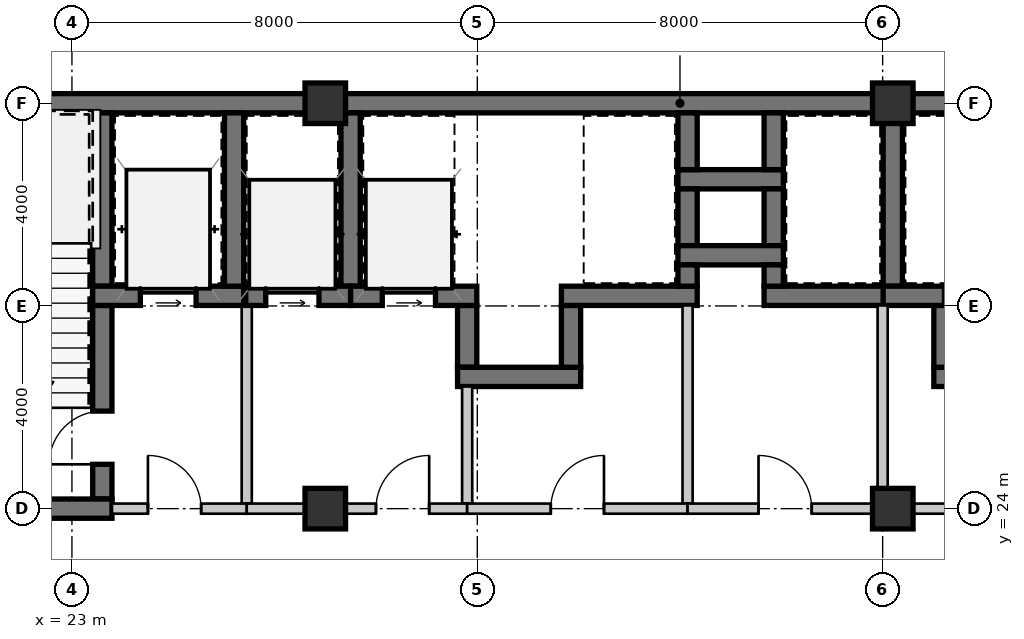
"""IFC4 building model, lengths in metres.
Left out: names, types, materials, properties, quantities, classifications, styles, units other than length and angle.
Written with IfcOpenShell. Run it as: python <this file> out.ifc"""

import sys

from ifc_helpers import new_model, si_unit, direction, frame, frame_2d, origin, origin_2d, place, context, subcontext, project, spatial, rectangle, extrude, source, transform, mapped, element, fill, save


model = new_model("IFC4")
c1 = context("Model", 3, precision=1e-05, world=origin(), true_north=direction((0.0, 1.0)))
c2 = subcontext(c1, "Body", "Model", "MODEL_VIEW")
j1 = project(units=[si_unit("LENGTHUNIT", "METRE"), si_unit("PLANEANGLEUNIT", "RADIAN")], contexts=[c1])
p1 = place(None, origin())
s1 = spatial("IfcSite", under=j1, at=p1, CompositionType="ELEMENT")
p2 = place(p1, origin())
s2 = spatial("IfcBuilding", under=s1, at=p2, CompositionType="ELEMENT")
p3 = place(p2, frame((0.0, 0.0, 57.75)))
s3 = spatial("IfcBuildingStorey", under=s2, at=p3, CompositionType="ELEMENT", Elevation=57.75)
m1 = source(origin(), c2, "Body", "SweptSolid", [
    extrude(rectangle(XDim=0.8, YDim=0.8, at=origin_2d()), origin(), (0.0, 0.0, 1.0), 3.15),
])
for number, where, z_axis, x_axis in (
    (1, (28.0, 24.0, 0.0), (0.0, 0.0, 1.0), (1.0, 0.0, 0.0)),
    (2, (39.2, 24.0, 0.0), (0.0, 0.0, 1.0), (1.0, 0.0, 0.0)),
    (3, (28.0, 32.0, 0.0), (0.0, 0.0, 1.0), (1.0, 0.0, 0.0)),
    (4, (39.2, 32.0, 0.0), (0.0, 0.0, 1.0), (1.0, 0.0, 0.0)),
):
    element("IfcColumn", number, at=place(p3, frame(where, z_axis=z_axis, x_axis=x_axis)), inside=s3, PredefinedType="COLUMN", context=c2, shape_type="MappedRepresentation", body=[
        mapped(m1, transform((0.0, 0.0, 0.0), scale=1.0)),
    ])
m2 = source(origin(), c2, "Body", "SweptSolid", [
    extrude(rectangle(XDim=9.19, YDim=0.38, at=frame_2d((4.595, 0.0))), origin(), (0.0, 0.0, 1.0), 2.87),
])
p4 = place(p3, frame((18.81, 32.0, 0.0), z_axis=(0.0, 0.0, 1.0), x_axis=(1.0, 0.0, 0.0)))
e5 = element("IfcWall", 5, at=p4, inside=s3, PredefinedType="SHEAR", context=c2, shape_type="MappedRepresentation", body=[
    mapped(m2, transform((0.0, 0.0, 0.0), scale=1.0)),
])
m3 = source(origin(), c2, "Body", "SweptSolid", [
    extrude(rectangle(XDim=11.2, YDim=0.38, at=frame_2d((5.6, 0.0))), origin(), (0.0, 0.0, 1.0), 2.87),
])
p5 = place(p3, frame((28.0, 32.0, 0.0), z_axis=(0.0, 0.0, 1.0), x_axis=(1.0, 0.0, 0.0)))
e6 = element("IfcWall", 6, at=p5, inside=s3, PredefinedType="SHEAR", context=c2, shape_type="MappedRepresentation", body=[
    mapped(m3, transform((0.0, 0.0, 0.0), scale=1.0)),
])
m4 = source(origin(), c2, "Body", "SweptSolid", [
    extrude(rectangle(XDim=11.99, YDim=0.38, at=frame_2d((5.995, 0.0))), origin(), (0.0, 0.0, 1.0), 2.87),
])
p6 = place(p3, frame((39.2, 32.0, 0.0), z_axis=(0.0, 0.0, 1.0), x_axis=(1.0, 0.0, 0.0)))
e7 = element("IfcWall", 7, at=p6, inside=s3, PredefinedType="SHEAR", context=c2, shape_type="MappedRepresentation", body=[
    mapped(m4, transform((0.0, 0.0, 0.0), scale=1.0)),
])
m5 = source(origin(), c2, "Body", "SweptSolid", [
    extrude(rectangle(XDim=3.42, YDim=0.38, at=frame_2d((1.71, 0.0))), origin(), (0.0, 0.0, 1.0), 2.87),
])
p7 = place(p3, frame((23.6, 28.39, 0.0), z_axis=(0.0, 0.0, 1.0), x_axis=(0.0, 1.0, 0.0)))
e8 = element("IfcWall", 8, at=p7, inside=s3, PredefinedType="SHEAR", context=c2, shape_type="MappedRepresentation", body=[
    mapped(m5, transform((0.0, 0.0, 0.0), scale=1.0)),
])
m6 = source(origin(), c2, "Body", "SweptSolid", [
    extrude(rectangle(XDim=3.82, YDim=0.38, at=frame_2d((1.91, 0.0))), origin(), (0.0, 0.0, 1.0), 2.87),
])
p8 = place(p3, frame((23.6, 24.19, 0.0), z_axis=(0.0, 0.0, 1.0), x_axis=(0.0, 1.0, 0.0)))
e9 = element("IfcWall", 9, at=p8, inside=s3, PredefinedType="SHEAR", context=c2, shape_type="MappedRepresentation", body=[
    mapped(m6, transform((0.0, 0.0, 0.0), scale=1.0)),
])
m7 = source(origin(), c2, "Body", "SweptSolid", [
    extrude(rectangle(XDim=1.05, YDim=2.1, at=frame_2d((0.525, 1.05))), frame((0.0, 0.2, 0.0), z_axis=(0.0, -1.0, 0.0), x_axis=(1.0, 0.0, 0.0)), (0.0, 0.0, 1.0), 0.4),
])
p9 = place(p8, frame((0.685, 0.0, 0.0)))
e10 = element("IfcOpeningElement", 10, at=p9, cuts=e9, PredefinedType="OPENING", context=c2, shape_type="MappedRepresentation", body=[
    mapped(m7, transform((0.0, 0.0, 0.0), scale=1.0)),
])
m8 = source(origin(), c2, "Body", "SweptSolid", [
    extrude(rectangle(XDim=4.98, YDim=0.38, at=frame_2d((2.49, 0.0))), origin(), (0.0, 0.0, 1.0), 2.87),
])
p10 = place(p3, frame((18.81, 24.0, 0.0), z_axis=(0.0, 0.0, 1.0), x_axis=(1.0, 0.0, 0.0)))
e11 = element("IfcWall", 11, at=p10, inside=s3, PredefinedType="SHEAR", context=c2, shape_type="MappedRepresentation", body=[
    mapped(m8, transform((0.0, 0.0, 0.0), scale=1.0)),
])
m9 = source(origin(), c2, "Body", "SweptSolid", [
    extrude(rectangle(XDim=2.98, YDim=0.38, at=frame_2d((1.49, 0.0))), origin(), (0.0, 0.0, 1.0), 2.87),
])
p11 = place(p3, frame((23.41, 28.2, 0.0), z_axis=(0.0, 0.0, 1.0), x_axis=(1.0, 0.0, 0.0)))
e12 = element("IfcWall", 12, at=p11, inside=s3, PredefinedType="SHEAR", context=c2, shape_type="MappedRepresentation", body=[
    mapped(m9, transform((0.0, 0.0, 0.0), scale=1.0)),
])
m10 = source(origin(), c2, "Body", "SweptSolid", [
    extrude(rectangle(XDim=1.1, YDim=2.15, at=frame_2d((0.55, 1.075))), frame((0.0, 0.2, 0.0), z_axis=(0.0, -1.0, 0.0), x_axis=(1.0, 0.0, 0.0)), (0.0, 0.0, 1.0), 0.4),
])
p12 = place(p11, frame((0.94, 0.0, 0.0)))
e13 = element("IfcOpeningElement", 13, at=p12, cuts=e12, PredefinedType="OPENING", context=c2, shape_type="MappedRepresentation", body=[
    mapped(m10, transform((0.0, 0.0, 0.0), scale=1.0)),
])
p13 = place(p3, frame((26.2, 28.39, 0.0), z_axis=(0.0, 0.0, 1.0), x_axis=(0.0, 1.0, 0.0)))
e14 = element("IfcWall", 14, at=p13, inside=s3, PredefinedType="SHEAR", context=c2, shape_type="MappedRepresentation", body=[
    mapped(m5, transform((0.0, 0.0, 0.0), scale=1.0)),
])
m11 = source(origin(), c2, "Body", "SweptSolid", [
    extrude(rectangle(XDim=3.91, YDim=0.2, at=frame_2d((1.955, 0.0))), origin(), (0.0, 0.0, 1.0), 2.87),
])
p14 = place(p3, frame((26.45, 24.1, 0.0), z_axis=(0.0, 0.0, 1.0), x_axis=(0.0, 1.0, 0.0)))
e15 = element("IfcWall", 15, at=p14, inside=s3, PredefinedType="SOLIDWALL", context=c2, shape_type="MappedRepresentation", body=[
    mapped(m11, transform((0.0, 0.0, 0.0), scale=1.0)),
])
m12 = source(origin(), c2, "Body", "SweptSolid", [
    extrude(rectangle(XDim=2.66, YDim=0.2, at=frame_2d((1.33, 0.0))), origin(), (0.0, 0.0, 1.0), 2.41),
])
p15 = place(p3, frame((23.79, 24.0, 0.0), z_axis=(0.0, 0.0, 1.0), x_axis=(1.0, 0.0, 0.0)))
e16 = element("IfcWall", 16, at=p15, inside=s3, PredefinedType="SOLIDWALL", context=c2, shape_type="MappedRepresentation", body=[
    mapped(m12, transform((0.0, 0.0, 0.0), scale=1.0)),
])
m13 = source(origin(), c2, "Body", "SweptSolid", [
    extrude(rectangle(XDim=1.05, YDim=2.1, at=frame_2d((0.525, 1.05))), frame((0.0, 0.11, 0.0), z_axis=(0.0, -1.0, 0.0), x_axis=(1.0, 0.0, 0.0)), (0.0, 0.0, 1.0), 0.22),
])
p16 = place(p15, frame((0.71, 0.0, 0.0)))
e17 = element("IfcOpeningElement", 17, at=p16, cuts=e16, PredefinedType="OPENING", context=c2, shape_type="MappedRepresentation", body=[
    mapped(m13, transform((0.0, 0.0, 0.0), scale=1.0)),
])
m14 = source(origin(), c2, "Body", "SweptSolid", [
    extrude(rectangle(XDim=2.08, YDim=0.38, at=frame_2d((1.04, 0.0))), origin(), (0.0, 0.0, 1.0), 2.87),
])
p17 = place(p3, frame((34.96, 30.5, 0.0), z_axis=(0.0, 0.0, 1.0), x_axis=(1.0, 0.0, 0.0)))
e18 = element("IfcWall", 18, at=p17, inside=s3, PredefinedType="SHEAR", context=c2, shape_type="MappedRepresentation", body=[
    mapped(m14, transform((0.0, 0.0, 0.0), scale=1.0)),
])
m15 = source(origin(), c2, "Body", "SweptSolid", [
    extrude(rectangle(XDim=1.12, YDim=0.38, at=frame_2d((0.56, 0.0))), origin(), (0.0, 0.0, 1.0), 2.87),
])
for number, where, z_axis, x_axis in (
    (19, (35.15, 31.81, 0.0), (0.0, 0.0, 1.0), (0.0, -1.0, 0.0)),
    (20, (36.85, 30.69, 0.0), (0.0, 0.0, 1.0), (0.0, 1.0, 0.0)),
    (21, (35.15, 30.31, 0.0), (0.0, 0.0, 1.0), (0.0, -1.0, 0.0)),
    (22, (36.85, 29.19, 0.0), (0.0, 0.0, 1.0), (0.0, 1.0, 0.0)),
):
    element("IfcWall", number, at=place(p3, frame(where, z_axis=z_axis, x_axis=x_axis)), inside=s3, PredefinedType="SHEAR", context=c2, shape_type="MappedRepresentation", body=[
        mapped(m15, transform((0.0, 0.0, 0.0), scale=1.0)),
    ])
p18 = place(p3, frame((34.96, 29.0, 0.0), z_axis=(0.0, 0.0, 1.0), x_axis=(1.0, 0.0, 0.0)))
e23 = element("IfcWall", 23, at=p18, inside=s3, PredefinedType="SHEAR", context=c2, shape_type="MappedRepresentation", body=[
    mapped(m14, transform((0.0, 0.0, 0.0), scale=1.0)),
])
m16 = source(origin(), c2, "Body", "SweptSolid", [
    extrude(rectangle(XDim=1.22, YDim=0.38, at=frame_2d((0.61, 0.0))), origin(), (0.0, 0.0, 1.0), 2.87),
])
p19 = place(p3, frame((30.8, 28.01, 0.0), z_axis=(0.0, 0.0, 1.0), x_axis=(0.0, -1.0, 0.0)))
e24 = element("IfcWall", 24, at=p19, inside=s3, PredefinedType="SHEAR", context=c2, shape_type="MappedRepresentation", body=[
    mapped(m16, transform((0.0, 0.0, 0.0), scale=1.0)),
])
m17 = source(origin(), c2, "Body", "SweptSolid", [
    extrude(rectangle(XDim=2.43, YDim=0.38, at=frame_2d((1.215, 0.0))), origin(), (0.0, 0.0, 1.0), 2.87),
])
p20 = place(p3, frame((30.61, 26.6, 0.0), z_axis=(0.0, 0.0, 1.0), x_axis=(1.0, 0.0, 0.0)))
e25 = element("IfcWall", 25, at=p20, inside=s3, PredefinedType="SHEAR", context=c2, shape_type="MappedRepresentation", body=[
    mapped(m17, transform((0.0, 0.0, 0.0), scale=1.0)),
])
p21 = place(p3, frame((32.85, 26.79, 0.0), z_axis=(0.0, 0.0, 1.0), x_axis=(0.0, 1.0, 0.0)))
e26 = element("IfcWall", 26, at=p21, inside=s3, PredefinedType="SHEAR", context=c2, shape_type="MappedRepresentation", body=[
    mapped(m16, transform((0.0, 0.0, 0.0), scale=1.0)),
])
m18 = source(origin(), c2, "Body", "SweptSolid", [
    extrude(rectangle(XDim=1.32, YDim=0.38, at=frame_2d((0.66, 0.0))), origin(), (0.0, 0.0, 1.0), 2.87),
])
p22 = place(p3, frame((41.52, 28.2, 0.0), z_axis=(0.0, 0.0, 1.0), x_axis=(-1.0, 0.0, 0.0)))
e27 = element("IfcWall", 27, at=p22, inside=s3, PredefinedType="SHEAR", context=c2, shape_type="MappedRepresentation", body=[
    mapped(m18, transform((0.0, 0.0, 0.0), scale=1.0)),
])
m19 = source(origin(), c2, "Body", "SweptSolid", [
    extrude(rectangle(XDim=2.33, YDim=0.38, at=frame_2d((1.165, 0.0))), origin(), (0.0, 0.0, 1.0), 2.87),
])
p23 = place(p3, frame((40.01, 26.6, 0.0), z_axis=(0.0, 0.0, 1.0), x_axis=(1.0, 0.0, 0.0)))
e28 = element("IfcWall", 28, at=p23, inside=s3, PredefinedType="SHEAR", context=c2, shape_type="MappedRepresentation", body=[
    mapped(m19, transform((0.0, 0.0, 0.0), scale=1.0)),
])
p24 = place(p3, frame((40.2, 28.01, 0.0), z_axis=(0.0, 0.0, 1.0), x_axis=(0.0, -1.0, 0.0)))
e29 = element("IfcWall", 29, at=p24, inside=s3, PredefinedType="SHEAR", context=c2, shape_type="MappedRepresentation", body=[
    mapped(m16, transform((0.0, 0.0, 0.0), scale=1.0)),
])
p25 = place(p3, frame((28.5, 28.39, 0.0), z_axis=(0.0, 0.0, 1.0), x_axis=(0.0, 1.0, 0.0)))
e30 = element("IfcWall", 30, at=p25, inside=s3, PredefinedType="SHEAR", context=c2, shape_type="MappedRepresentation", body=[
    mapped(m5, transform((0.0, 0.0, 0.0), scale=1.0)),
])
m20 = source(origin(), c2, "Body", "SweptSolid", [
    extrude(rectangle(XDim=2.07, YDim=0.38, at=frame_2d((1.035, 0.0))), origin(), (0.0, 0.0, 1.0), 2.87),
])
p26 = place(p3, frame((26.43, 28.2, 0.0), z_axis=(0.0, 0.0, 1.0), x_axis=(1.0, 0.0, 0.0)))
e31 = element("IfcWall", 31, at=p26, inside=s3, PredefinedType="SHEAR", context=c2, shape_type="MappedRepresentation", body=[
    mapped(m20, transform((0.0, 0.0, 0.0), scale=1.0)),
])
m21 = source(origin(), c2, "Body", "SweptSolid", [
    extrude(rectangle(XDim=1.05, YDim=2.15, at=frame_2d((0.525, 1.075))), frame((0.0, 0.2, 0.0), z_axis=(0.0, -1.0, 0.0), x_axis=(1.0, 0.0, 0.0)), (0.0, 0.0, 1.0), 0.4),
])
p27 = place(p26, frame((0.395, 0.0, 0.0)))
e32 = element("IfcOpeningElement", 32, at=p27, cuts=e31, PredefinedType="OPENING", context=c2, shape_type="MappedRepresentation", body=[
    mapped(m21, transform((0.0, 0.0, 0.0), scale=1.0)),
])
m22 = source(origin(), c2, "Body", "SweptSolid", [
    extrude(rectangle(XDim=2.49, YDim=0.38, at=frame_2d((1.245, 0.0))), origin(), (0.0, 0.0, 1.0), 2.87),
])
p28 = place(p3, frame((28.5, 28.2, 0.0), z_axis=(0.0, 0.0, 1.0), x_axis=(1.0, 0.0, 0.0)))
e33 = element("IfcWall", 33, at=p28, inside=s3, PredefinedType="SHEAR", context=c2, shape_type="MappedRepresentation", body=[
    mapped(m22, transform((0.0, 0.0, 0.0), scale=1.0)),
])
p29 = place(p28, frame((0.625, 0.0, 0.0)))
e34 = element("IfcOpeningElement", 34, at=p29, cuts=e33, PredefinedType="OPENING", context=c2, shape_type="MappedRepresentation", body=[
    mapped(m21, transform((0.0, 0.0, 0.0), scale=1.0)),
])
m23 = source(origin(), c2, "Body", "SweptSolid", [
    extrude(rectangle(XDim=2.31, YDim=0.2, at=frame_2d((1.155, 0.0))), origin(), (0.0, 0.0, 1.0), 2.87),
])
p30 = place(p3, frame((30.8, 26.41, 0.0), z_axis=(0.0, 0.0, 1.0), x_axis=(0.0, -1.0, 0.0)))
e35 = element("IfcWall", 35, at=p30, inside=s3, PredefinedType="SOLIDWALL", context=c2, shape_type="MappedRepresentation", body=[
    mapped(m23, transform((0.0, 0.0, 0.0), scale=1.0)),
])
m24 = source(origin(), c2, "Body", "SweptSolid", [
    extrude(rectangle(XDim=4.35, YDim=0.2, at=frame_2d((2.175, 0.0))), origin(), (0.0, 0.0, 1.0), 2.41),
])
p31 = place(p3, frame((30.8, 24.0, 0.0), z_axis=(0.0, 0.0, 1.0), x_axis=(-1.0, 0.0, 0.0)))
e36 = element("IfcWall", 36, at=p31, inside=s3, PredefinedType="SOLIDWALL", context=c2, shape_type="MappedRepresentation", body=[
    mapped(m24, transform((0.0, 0.0, 0.0), scale=1.0)),
])
p32 = place(p31, frame((0.75, 0.0, 0.0)))
e37 = element("IfcOpeningElement", 37, at=p32, cuts=e36, PredefinedType="OPENING", context=c2, shape_type="MappedRepresentation", body=[
    mapped(m13, transform((0.0, 0.0, 0.0), scale=1.0)),
])
m25 = source(origin(), c2, "Body", "SweptSolid", [
    extrude(rectangle(XDim=2.68, YDim=0.38, at=frame_2d((1.34, 0.0))), origin(), (0.0, 0.0, 1.0), 2.87),
])
p33 = place(p3, frame((32.66, 28.2, 0.0), z_axis=(0.0, 0.0, 1.0), x_axis=(1.0, 0.0, 0.0)))
e38 = element("IfcWall", 38, at=p33, inside=s3, PredefinedType="SHEAR", context=c2, shape_type="MappedRepresentation", body=[
    mapped(m25, transform((0.0, 0.0, 0.0), scale=1.0)),
])
m26 = source(origin(), c2, "Body", "SweptSolid", [
    extrude(rectangle(XDim=0.42, YDim=0.38, at=frame_2d((0.21, 0.0))), origin(), (0.0, 0.0, 1.0), 2.87),
])
p34 = place(p3, frame((35.15, 28.39, 0.0), z_axis=(0.0, 0.0, 1.0), x_axis=(0.0, 1.0, 0.0)))
e39 = element("IfcWall", 39, at=p34, inside=s3, PredefinedType="SHEAR", context=c2, shape_type="MappedRepresentation", body=[
    mapped(m26, transform((0.0, 0.0, 0.0), scale=1.0)),
])
p35 = place(p3, frame((39.2, 28.39, 0.0), z_axis=(0.0, 0.0, 1.0), x_axis=(0.0, 1.0, 0.0)))
e40 = element("IfcWall", 40, at=p35, inside=s3, PredefinedType="SHEAR", context=c2, shape_type="MappedRepresentation", body=[
    mapped(m5, transform((0.0, 0.0, 0.0), scale=1.0)),
])
m27 = source(origin(), c2, "Body", "SweptSolid", [
    extrude(rectangle(XDim=2.36, YDim=0.38, at=frame_2d((1.18, 0.0))), origin(), (0.0, 0.0, 1.0), 2.87),
])
p36 = place(p3, frame((36.66, 28.2, 0.0), z_axis=(0.0, 0.0, 1.0), x_axis=(1.0, 0.0, 0.0)))
e41 = element("IfcWall", 41, at=p36, inside=s3, PredefinedType="SHEAR", context=c2, shape_type="MappedRepresentation", body=[
    mapped(m27, transform((0.0, 0.0, 0.0), scale=1.0)),
])
p37 = place(p3, frame((36.85, 28.81, 0.0), z_axis=(0.0, 0.0, 1.0), x_axis=(0.0, -1.0, 0.0)))
e42 = element("IfcWall", 42, at=p37, inside=s3, PredefinedType="SHEAR", context=c2, shape_type="MappedRepresentation", body=[
    mapped(m26, transform((0.0, 0.0, 0.0), scale=1.0)),
])
m28 = source(origin(), c2, "Body", "SweptSolid", [
    extrude(rectangle(XDim=1.21, YDim=0.38, at=frame_2d((0.605, 0.0))), origin(), (0.0, 0.0, 1.0), 2.87),
])
p38 = place(p3, frame((39.01, 28.2, 0.0), z_axis=(0.0, 0.0, 1.0), x_axis=(1.0, 0.0, 0.0)))
e43 = element("IfcWall", 43, at=p38, inside=s3, PredefinedType="SHEAR", context=c2, shape_type="MappedRepresentation", body=[
    mapped(m28, transform((0.0, 0.0, 0.0), scale=1.0)),
])
p39 = place(p3, frame((35.15, 28.01, 0.0), z_axis=(0.0, 0.0, 1.0), x_axis=(0.0, -1.0, 0.0)))
e44 = element("IfcWall", 44, at=p39, inside=s3, PredefinedType="SOLIDWALL", context=c2, shape_type="MappedRepresentation", body=[
    mapped(m11, transform((0.0, 0.0, 0.0), scale=1.0)),
])
m29 = source(origin(), c2, "Body", "SweptSolid", [
    extrude(rectangle(XDim=4.35, YDim=0.2, at=frame_2d((2.175, 0.0))), origin(), (0.0, 0.0, 1.0), 2.41),
])
p40 = place(p3, frame((35.15, 24.0, 0.0), z_axis=(0.0, 0.0, 1.0), x_axis=(-1.0, 0.0, 0.0)))
e45 = element("IfcWall", 45, at=p40, inside=s3, PredefinedType="SOLIDWALL", context=c2, shape_type="MappedRepresentation", body=[
    mapped(m29, transform((0.0, 0.0, 0.0), scale=1.0)),
])
p41 = place(p40, frame((1.65, 0.0, 0.0)))
e46 = element("IfcOpeningElement", 46, at=p41, cuts=e45, PredefinedType="OPENING", context=c2, shape_type="MappedRepresentation", body=[
    mapped(m13, transform((0.0, 0.0, 0.0), scale=1.0)),
])
p42 = place(p3, frame((39.0, 28.01, 0.0), z_axis=(0.0, 0.0, 1.0), x_axis=(0.0, -1.0, 0.0)))
e47 = element("IfcWall", 47, at=p42, inside=s3, PredefinedType="SOLIDWALL", context=c2, shape_type="MappedRepresentation", body=[
    mapped(m11, transform((0.0, 0.0, 0.0), scale=1.0)),
])
m30 = source(origin(), c2, "Body", "SweptSolid", [
    extrude(rectangle(XDim=3.85, YDim=0.2, at=frame_2d((1.925, 0.0))), origin(), (0.0, 0.0, 1.0), 2.41),
])
p43 = place(p3, frame((39.0, 24.0, 0.0), z_axis=(0.0, 0.0, 1.0), x_axis=(-1.0, 0.0, 0.0)))
e48 = element("IfcWall", 48, at=p43, inside=s3, PredefinedType="SOLIDWALL", context=c2, shape_type="MappedRepresentation", body=[
    mapped(m30, transform((0.0, 0.0, 0.0), scale=1.0)),
])
p44 = place(p43, frame((1.4, 0.0, 0.0)))
e49 = element("IfcOpeningElement", 49, at=p44, cuts=e48, PredefinedType="OPENING", context=c2, shape_type="MappedRepresentation", body=[
    mapped(m13, transform((0.0, 0.0, 0.0), scale=1.0)),
])
m31 = source(origin(), c2, "Body", "SweptSolid", [
    extrude(rectangle(XDim=4.55, YDim=0.2, at=frame_2d((2.275, 0.0))), origin(), (0.0, 0.0, 1.0), 2.337),
])
p45 = place(p3, frame((43.55, 24.0, 0.0), z_axis=(0.0, 0.0, 1.0), x_axis=(-1.0, 0.0, 0.0)))
e50 = element("IfcWall", 50, at=p45, inside=s3, PredefinedType="SOLIDWALL", context=c2, shape_type="MappedRepresentation", body=[
    mapped(m31, transform((0.0, 0.0, 0.0), scale=1.0)),
])
p46 = place(p45, frame((1.75, 0.0, 0.0)))
e51 = element("IfcOpeningElement", 51, at=p46, cuts=e50, PredefinedType="OPENING", context=c2, shape_type="MappedRepresentation", body=[
    mapped(m13, transform((0.0, 0.0, 0.0), scale=1.0)),
])
m32 = source(origin(), c2, "Body", "SweptSolid", [
    extrude(rectangle(XDim=1.05, YDim=2.1, at=frame_2d((0.525, 1.05))), frame((0.0, 0.025, 0.0), z_axis=(0.0, -1.0, 0.0), x_axis=(1.0, 0.0, 0.0)), (0.0, 0.0, 1.0), 0.05),
])
p47 = place(p9, origin())
e52 = element("IfcDoor", 52, at=p47, inside=s3, OperationType="SINGLE_SWING_LEFT", PredefinedType="DOOR", context=c2, shape_type="MappedRepresentation", body=[
    mapped(m32, transform((0.0, 0.0, 0.0), scale=1.0)),
])
fill(e10, e52)
m33 = source(origin(), c2, "Body", "SweptSolid", [
    extrude(rectangle(XDim=1.1, YDim=2.15, at=frame_2d((0.55, 1.075))), frame((0.0, 0.025, 0.0), z_axis=(0.0, -1.0, 0.0), x_axis=(1.0, 0.0, 0.0)), (0.0, 0.0, 1.0), 0.05),
])
p48 = place(p12, origin())
e53 = element("IfcDoor", 53, at=p48, inside=s3, OperationType="SLIDING_TO_LEFT", PredefinedType="DOOR", context=c2, shape_type="MappedRepresentation", body=[
    mapped(m33, transform((0.0, 0.0, 0.0), scale=1.0)),
])
fill(e13, e53)
p49 = place(p16, origin())
e54 = element("IfcDoor", 54, at=p49, inside=s3, OperationType="SINGLE_SWING_LEFT", PredefinedType="DOOR", context=c2, shape_type="MappedRepresentation", body=[
    mapped(m32, transform((0.0, 0.0, 0.0), scale=1.0)),
])
fill(e17, e54)
m34 = source(origin(), c2, "Body", "SweptSolid", [
    extrude(rectangle(XDim=1.05, YDim=2.15, at=frame_2d((0.525, 1.075))), frame((0.0, 0.025, 0.0), z_axis=(0.0, -1.0, 0.0), x_axis=(1.0, 0.0, 0.0)), (0.0, 0.0, 1.0), 0.05),
])
p50 = place(p27, origin())
e55 = element("IfcDoor", 55, at=p50, inside=s3, OperationType="SLIDING_TO_LEFT", PredefinedType="DOOR", context=c2, shape_type="MappedRepresentation", body=[
    mapped(m34, transform((0.0, 0.0, 0.0), scale=1.0)),
])
fill(e32, e55)
p51 = place(p29, origin())
e56 = element("IfcDoor", 56, at=p51, inside=s3, OperationType="SLIDING_TO_LEFT", PredefinedType="DOOR", context=c2, shape_type="MappedRepresentation", body=[
    mapped(m34, transform((0.0, 0.0, 0.0), scale=1.0)),
])
fill(e34, e56)
p52 = place(p32, frame((1.05, 0.0, 0.0), z_axis=(0.0, 0.0, 1.0), x_axis=(-1.0, 0.0, 0.0)))
e57 = element("IfcDoor", 57, at=p52, inside=s3, OperationType="SINGLE_SWING_RIGHT", PredefinedType="DOOR", context=c2, shape_type="MappedRepresentation", body=[
    mapped(m32, transform((0.0, 0.0, 0.0), scale=1.0)),
])
fill(e37, e57)
p53 = place(p41, frame((1.05, 0.0, 0.0), z_axis=(0.0, 0.0, 1.0), x_axis=(-1.0, 0.0, 0.0)))
e58 = element("IfcDoor", 58, at=p53, inside=s3, OperationType="SINGLE_SWING_RIGHT", PredefinedType="DOOR", context=c2, shape_type="MappedRepresentation", body=[
    mapped(m32, transform((0.0, 0.0, 0.0), scale=1.0)),
])
fill(e46, e58)
p54 = place(p44, frame((1.05, 0.0, 0.0), z_axis=(0.0, 0.0, 1.0), x_axis=(-1.0, 0.0, 0.0)))
e59 = element("IfcDoor", 59, at=p54, inside=s3, OperationType="SINGLE_SWING_LEFT", PredefinedType="DOOR", context=c2, shape_type="MappedRepresentation", body=[
    mapped(m32, transform((0.0, 0.0, 0.0), scale=1.0)),
])
fill(e49, e59)
save(model, sys.argv[1])
